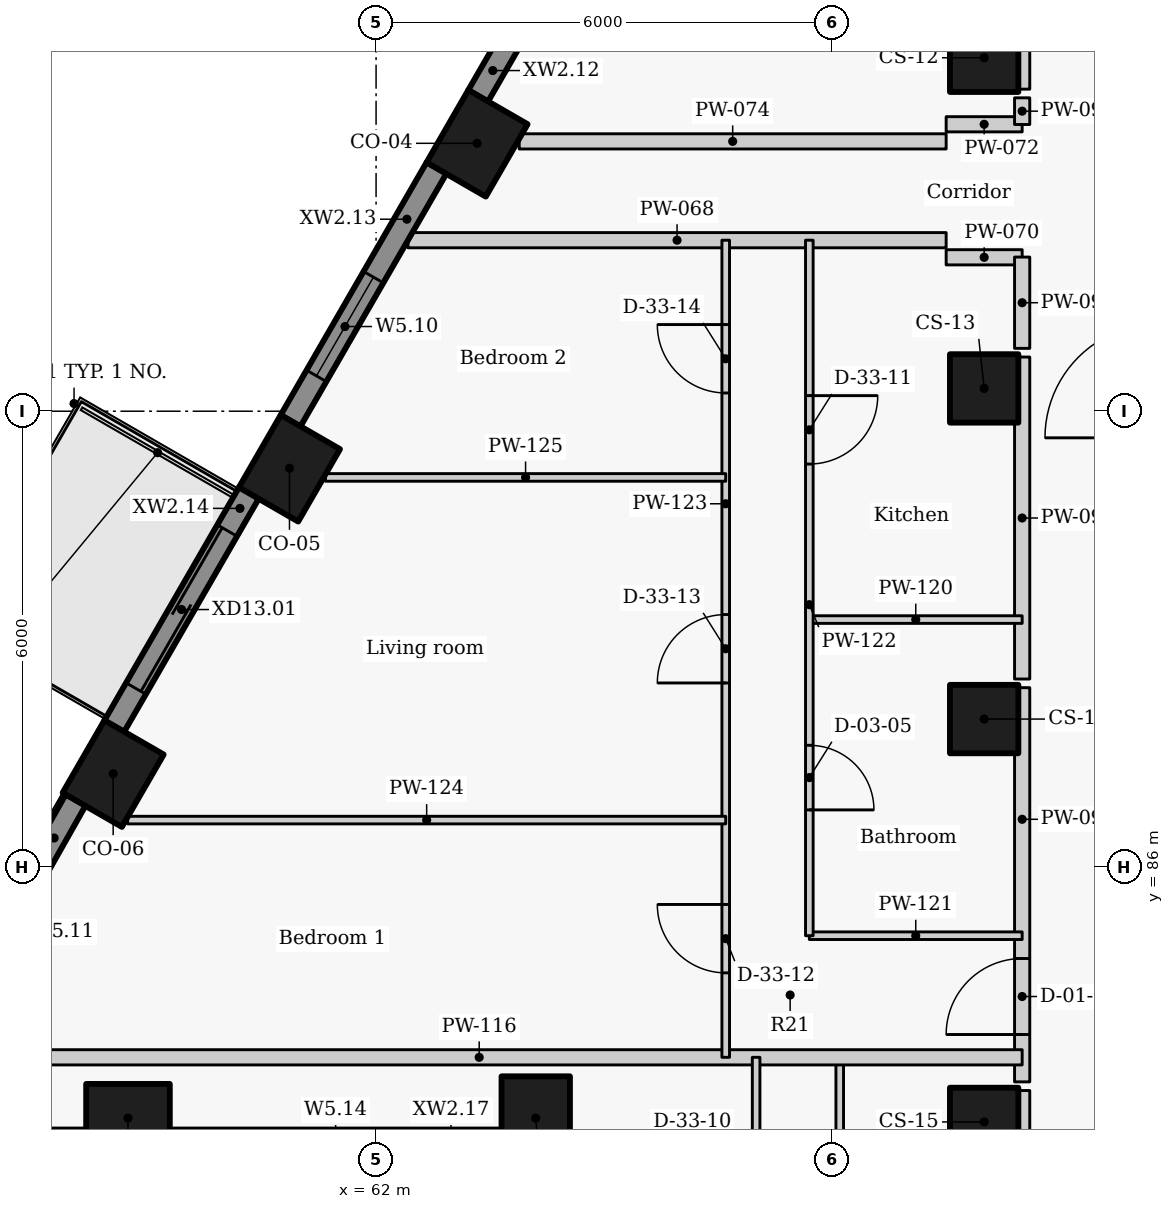
"""IFC4 building model, lengths in metres.
Left out: names, types, materials, properties, quantities, classifications, styles, units other than length and angle.
Written with IfcOpenShell. Run it as: python <this file> out.ifc"""

import sys

from ifc_helpers import new_model, si_unit, direction, frame, frame_2d, origin, origin_2d, place, context, subcontext, project, spatial, rectangle, extrude, element, fill, save


model = new_model("IFC4")
c1 = context("Model", 3, precision=1e-05, world=origin(), true_north=direction((0.0, 1.0)))
c2 = subcontext(c1, "Body", "Model", "MODEL_VIEW")
j1 = project(units=[si_unit("LENGTHUNIT", "METRE"), si_unit("PLANEANGLEUNIT", "RADIAN")], contexts=[c1])
p1 = place(None, origin())
s1 = spatial("IfcSite", under=j1, at=p1, CompositionType="ELEMENT")
p2 = place(p1, origin())
s2 = spatial("IfcBuilding", under=s1, at=p2, CompositionType="ELEMENT")
p3 = place(p2, frame((0.0, 0.0, 259.2)))
s3 = spatial("IfcBuildingStorey", under=s2, at=p3, CompositionType="ELEMENT", Elevation=259.2)
for number, where, z_axis, x_axis in (
    (1, (63.329, 95.525, 0.0), (0.0, 0.0, 1.0), (-0.5, -0.866, 0.0)),
    (2, (60.861, 91.25, 0.0), (0.0, 0.0, 1.0), (-0.5, -0.866, 0.0)),
    (3, (58.541, 87.232, 0.0), (0.0, 0.0, 1.0), (-0.5, -0.866, 0.0)),
    (4, (58.736, 82.7, 0.0), (0.0, 0.0, 1.0), (1.0, 0.0, 0.0)),
    (5, (64.101, 82.7, 0.0), (0.0, 0.0, 1.0), (0.0, -1.0, 0.0)),
):
    element("IfcColumn", number, at=place(p3, frame(where, z_axis=z_axis, x_axis=x_axis)), inside=s3, PredefinedType="COLUMN", context=c2, shape_type="SweptSolid", body=[
        extrude(rectangle(XDim=1.1, YDim=0.9, at=origin_2d()), origin(), (0.0, 0.0, 1.0), 3.3),
    ])
for number, where, z_axis, x_axis in (
    (6, (70.0, 96.65, 0.0), (0.0, 0.0, 1.0), (0.0, -1.0, 0.0)),
    (7, (70.0, 92.3, 0.0), (0.0, 0.0, 1.0), (0.0, -1.0, 0.0)),
    (8, (70.0, 87.95, 0.0), (0.0, 0.0, 1.0), (0.0, -1.0, 0.0)),
    (9, (70.0, 82.65, 0.0), (0.0, 0.0, 1.0), (0.0, -1.0, 0.0)),
):
    element("IfcColumn", number, at=place(p3, frame(where, z_axis=z_axis, x_axis=x_axis)), inside=s3, PredefinedType="COLUMN", context=c2, shape_type="SweptSolid", body=[
        extrude(rectangle(XDim=0.9, YDim=0.9, at=origin_2d()), origin(), (0.0, 0.0, 1.0), 3.3),
    ])
p4 = place(p3, frame((65.264, 99.477, 0.0), z_axis=(0.0, 0.0, 1.0), x_axis=(-0.499984490703, -0.866034357896, 0.0)))
e10 = element("IfcWall", 10, at=p4, inside=s3, PredefinedType="SOLIDWALL", context=c2, shape_type="SweptSolid", body=[
    extrude(rectangle(XDim=3.844, YDim=0.3, at=frame_2d((1.922, 0.0))), origin(), (0.0, 0.0, 1.0), 2.425),
])
p5 = place(p4, frame((0.872, 0.0, 0.9)))
e11 = element("IfcOpeningElement", 11, at=p5, cuts=e10, PredefinedType="OPENING", context=c2, shape_type="SweptSolid", body=[
    extrude(rectangle(XDim=2.1, YDim=1.1, at=frame_2d((1.05, 0.55))), frame((0.0, 0.16, 0.0), z_axis=(0.0, -1.0, 0.0), x_axis=(1.0, 0.0, 0.0)), (0.0, 0.0, 1.0), 0.32),
])
p6 = place(p3, frame((62.796, 95.202, 0.0), z_axis=(0.0, 0.0, 1.0), x_axis=(-0.499984490703, -0.866034357896, 0.0)))
e12 = element("IfcWall", 12, at=p6, inside=s3, PredefinedType="SOLIDWALL", context=c2, shape_type="SweptSolid", body=[
    extrude(rectangle(XDim=3.844, YDim=0.3, at=frame_2d((1.922, 0.0))), origin(), (0.0, 0.0, 1.0), 2.425),
])
p7 = place(p6, frame((1.661, 0.0, 0.9)))
e13 = element("IfcOpeningElement", 13, at=p7, cuts=e12, PredefinedType="OPENING", context=c2, shape_type="SweptSolid", body=[
    extrude(rectangle(XDim=1.5, YDim=1.1, at=frame_2d((0.75, 0.55))), frame((0.0, 0.16, 0.0), z_axis=(0.0, -1.0, 0.0), x_axis=(1.0, 0.0, 0.0)), (0.0, 0.0, 1.0), 0.32),
])
p8 = place(p3, frame((60.328, 90.927, 0.0), z_axis=(0.0, 0.0, 1.0), x_axis=(-0.500010404316, -0.866019396766, 0.0)))
e14 = element("IfcWall", 14, at=p8, inside=s3, PredefinedType="SOLIDWALL", context=c2, shape_type="SweptSolid", body=[
    extrude(rectangle(XDim=3.547, YDim=0.3, at=frame_2d((1.774, 0.0))), origin(), (0.0, 0.0, 1.0), 2.425),
])
p9 = place(p8, frame((0.573, 0.0, 0.0)))
e15 = element("IfcOpeningElement", 15, at=p9, cuts=e14, PredefinedType="OPENING", context=c2, shape_type="SweptSolid", body=[
    extrude(rectangle(XDim=2.4, YDim=2.0, at=frame_2d((1.2, 1.0))), frame((0.0, 0.16, 0.0), z_axis=(0.0, -1.0, 0.0), x_axis=(1.0, 0.0, 0.0)), (0.0, 0.0, 1.0), 0.32),
])
p10 = place(p3, frame((58.048, 86.886, 0.0), z_axis=(0.0, 0.0, 1.0), x_axis=(-0.492080931903, -0.870549456641, 0.0)))
e16 = element("IfcWall", 16, at=p10, inside=s3, PredefinedType="SOLIDWALL", context=c2, shape_type="SweptSolid", body=[
    extrude(rectangle(XDim=5.437, YDim=0.3, at=frame_2d((2.718, 0.0))), origin(), (0.0, 0.0, 1.0), 2.425),
])
p11 = place(p10, frame((1.251, 0.0, 0.9)))
e17 = element("IfcOpeningElement", 17, at=p11, cuts=e16, PredefinedType="OPENING", context=c2, shape_type="SweptSolid", body=[
    extrude(rectangle(XDim=1.5, YDim=1.1, at=frame_2d((0.75, 0.55))), frame((0.0, 0.16, 0.0), z_axis=(0.0, -1.0, 0.0), x_axis=(1.0, 0.0, 0.0)), (0.0, 0.0, 1.0), 0.32),
])
p12 = place(p10, frame((4.04, 0.0, 0.9)))
e18 = element("IfcOpeningElement", 18, at=p12, cuts=e16, PredefinedType="OPENING", context=c2, shape_type="SweptSolid", body=[
    extrude(rectangle(XDim=0.6, YDim=1.1, at=frame_2d((0.3, 0.55))), frame((0.0, 0.16, 0.0), z_axis=(0.0, -1.0, 0.0), x_axis=(1.0, 0.0, 0.0)), (0.0, 0.0, 1.0), 0.32),
])
p13 = place(p3, frame((62.42, 94.25, 0.0), z_axis=(0.0, 0.0, 1.0), x_axis=(1.0, 0.0, 0.0)))
e19 = element("IfcWall", 19, at=p13, inside=s3, PredefinedType="PARTITIONING", context=c2, shape_type="SweptSolid", body=[
    extrude(rectangle(XDim=7.08, YDim=0.2, at=frame_2d((3.54, 0.0))), origin(), (0.0, 0.0, 1.0), 2.405),
])
for number, where, z_axis, x_axis in (
    (20, (69.5, 94.025, 0.0), (0.0, 0.0, 1.0), (1.0, 0.0, 0.0)),
    (21, (69.5, 95.775, 0.0), (0.0, 0.0, 1.0), (1.0, 0.0, 0.0)),
):
    element("IfcWall", number, at=place(p3, frame(where, z_axis=z_axis, x_axis=x_axis)), inside=s3, PredefinedType="PARTITIONING", context=c2, shape_type="SweptSolid", body=[
        extrude(rectangle(XDim=1.0, YDim=0.2, at=frame_2d((0.5, 0.0))), origin(), (0.0, 0.0, 1.0), 2.505),
    ])
p14 = place(p3, frame((63.883, 95.55, 0.0), z_axis=(0.0, 0.0, 1.0), x_axis=(1.0, 0.0, 0.0)))
e22 = element("IfcWall", 22, at=p14, inside=s3, PredefinedType="PARTITIONING", context=c2, shape_type="SweptSolid", body=[
    extrude(rectangle(XDim=5.617, YDim=0.2, at=frame_2d((2.808, 0.0))), origin(), (0.0, 0.0, 1.0), 3.025),
])
p15 = place(p3, frame((70.5, 77.877, 0.0), z_axis=(0.0, 0.0, 1.0), x_axis=(0.0, 1.0, 0.0)))
e23 = element("IfcWall", 23, at=p15, inside=s3, PredefinedType="PARTITIONING", context=c2, shape_type="SweptSolid", body=[
    extrude(rectangle(XDim=5.186, YDim=0.2, at=frame_2d((2.593, 0.0))), origin(), (0.0, 0.0, 1.0), 3.025),
])
p16 = place(p3, frame((70.5, 83.177, 0.0), z_axis=(0.0, 0.0, 1.0), x_axis=(0.0, 1.0, 0.0)))
e24 = element("IfcWall", 24, at=p16, inside=s3, PredefinedType="PARTITIONING", context=c2, shape_type="SweptSolid", body=[
    extrude(rectangle(XDim=5.186, YDim=0.2, at=frame_2d((2.593, 0.0))), origin(), (0.0, 0.0, 1.0), 3.025),
])
p17 = place(p16, frame((0.623, 0.0, 0.0)))
e25 = element("IfcOpeningElement", 25, at=p17, cuts=e24, PredefinedType="OPENING", context=c2, shape_type="SweptSolid", body=[
    extrude(rectangle(XDim=1.0, YDim=2.1, at=frame_2d((0.5, 1.05))), frame((0.0, 0.11, 0.0), z_axis=(0.0, -1.0, 0.0), x_axis=(1.0, 0.0, 0.0)), (0.0, 0.0, 1.0), 0.22),
])
p18 = place(p3, frame((70.5, 88.477, 0.0), z_axis=(0.0, 0.0, 1.0), x_axis=(0.0, 1.0, 0.0)))
e26 = element("IfcWall", 26, at=p18, inside=s3, PredefinedType="PARTITIONING", context=c2, shape_type="SweptSolid", body=[
    extrude(rectangle(XDim=4.236, YDim=0.2, at=frame_2d((2.118, 0.0))), origin(), (0.0, 0.0, 1.0), 3.025),
])
p19 = place(p3, frame((70.5, 92.827, 0.0), z_axis=(0.0, 0.0, 1.0), x_axis=(0.0, 1.0, 0.0)))
e27 = element("IfcWall", 27, at=p19, inside=s3, PredefinedType="PARTITIONING", context=c2, shape_type="SweptSolid", body=[
    extrude(rectangle(XDim=1.201, YDim=0.2, at=frame_2d((0.601, 0.0))), origin(), (0.0, 0.0, 1.0), 3.025),
])
p20 = place(p3, frame((70.5, 95.772, 0.0), z_axis=(0.0, 0.0, 1.0), x_axis=(0.0, 1.0, 0.0)))
e28 = element("IfcWall", 28, at=p20, inside=s3, PredefinedType="PARTITIONING", context=c2, shape_type="SweptSolid", body=[
    extrude(rectangle(XDim=0.351, YDim=0.2, at=frame_2d((0.176, 0.0))), origin(), (0.0, 0.0, 1.0), 3.025),
])
p21 = place(p3, frame((70.5, 96.237, 0.0), z_axis=(0.0, 0.0, 1.0), x_axis=(0.0, 1.0, 0.0)))
e29 = element("IfcWall", 29, at=p21, inside=s3, PredefinedType="PARTITIONING", context=c2, shape_type="SweptSolid", body=[
    extrude(rectangle(XDim=5.176, YDim=0.2, at=frame_2d((2.588, 0.0))), origin(), (0.0, 0.0, 1.0), 3.025),
])
p22 = place(p21, frame((2.088, 0.0, 0.0)))
e30 = element("IfcOpeningElement", 30, at=p22, cuts=e29, PredefinedType="OPENING", context=c2, shape_type="SweptSolid", body=[
    extrude(rectangle(XDim=1.0, YDim=2.1, at=frame_2d((0.5, 1.05))), frame((0.0, 0.11, 0.0), z_axis=(0.0, -1.0, 0.0), x_axis=(1.0, 0.0, 0.0)), (0.0, 0.0, 1.0), 0.22),
])
p23 = place(p3, frame((68.1, 83.5, 0.0), z_axis=(0.0, 0.0, 1.0), x_axis=(0.0, -1.0, 0.0)))
e31 = element("IfcWall", 31, at=p23, inside=s3, PredefinedType="PARTITIONING", context=c2, shape_type="SweptSolid", body=[
    extrude(rectangle(XDim=8.9, YDim=0.1, at=frame_2d((4.45, 0.0))), origin(), (0.0, 0.0, 1.0), 3.025),
])
p24 = place(p23, frame((6.452, 0.0, 0.0)))
e32 = element("IfcOpeningElement", 32, at=p24, cuts=e31, PredefinedType="OPENING", context=c2, shape_type="SweptSolid", body=[
    extrude(rectangle(XDim=0.85, YDim=2.1, at=frame_2d((0.425, 1.05))), frame((0.0, 0.06, 0.0), z_axis=(0.0, -1.0, 0.0), x_axis=(1.0, 0.0, 0.0)), (0.0, 0.0, 1.0), 0.12),
])
p25 = place(p23, frame((1.977, 0.0, 0.0)))
e33 = element("IfcOpeningElement", 33, at=p25, cuts=e31, PredefinedType="OPENING", context=c2, shape_type="SweptSolid", body=[
    extrude(rectangle(XDim=0.9, YDim=2.1, at=frame_2d((0.45, 1.05))), frame((0.0, 0.06, 0.0), z_axis=(0.0, -1.0, 0.0), x_axis=(1.0, 0.0, 0.0)), (0.0, 0.0, 1.0), 0.12),
])
p26 = place(p3, frame((56.213, 83.5, 0.0), z_axis=(0.0, 0.0, 1.0), x_axis=(1.0, 0.0, 0.0)))
e34 = element("IfcWall", 34, at=p26, inside=s3, PredefinedType="PARTITIONING", context=c2, shape_type="SweptSolid", body=[
    extrude(rectangle(XDim=14.287, YDim=0.2, at=frame_2d((7.144, 0.0))), origin(), (0.0, 0.0, 1.0), 2.405),
])
p27 = place(p3, frame((67.0, 73.0, 0.0), z_axis=(0.0, 0.0, 1.0), x_axis=(0.0, 1.0, 0.0)))
e35 = element("IfcWall", 35, at=p27, inside=s3, PredefinedType="PARTITIONING", context=c2, shape_type="SweptSolid", body=[
    extrude(rectangle(XDim=10.5, YDim=0.1, at=frame_2d((5.25, 0.0))), origin(), (0.0, 0.0, 1.0), 3.025),
])
p28 = place(p27, frame((1.074, 0.0, 0.0)))
e36 = element("IfcOpeningElement", 36, at=p28, cuts=e35, PredefinedType="OPENING", context=c2, shape_type="SweptSolid", body=[
    extrude(rectangle(XDim=0.9, YDim=2.1, at=frame_2d((0.45, 1.05))), frame((0.0, 0.06, 0.0), z_axis=(0.0, -1.0, 0.0), x_axis=(1.0, 0.0, 0.0)), (0.0, 0.0, 1.0), 0.12),
])
p29 = place(p27, frame((4.8, 0.0, 0.0)))
e37 = element("IfcOpeningElement", 37, at=p29, cuts=e35, PredefinedType="OPENING", context=c2, shape_type="SweptSolid", body=[
    extrude(rectangle(XDim=0.9, YDim=2.1, at=frame_2d((0.45, 1.05))), frame((0.0, 0.06, 0.0), z_axis=(0.0, -1.0, 0.0), x_axis=(1.0, 0.0, 0.0)), (0.0, 0.0, 1.0), 0.12),
])
p30 = place(p27, frame((8.526, 0.0, 0.0)))
e38 = element("IfcOpeningElement", 38, at=p30, cuts=e35, PredefinedType="OPENING", context=c2, shape_type="SweptSolid", body=[
    extrude(rectangle(XDim=0.9, YDim=2.1, at=frame_2d((0.45, 1.05))), frame((0.0, 0.06, 0.0), z_axis=(0.0, -1.0, 0.0), x_axis=(1.0, 0.0, 0.0)), (0.0, 0.0, 1.0), 0.12),
])
for number, where, z_axis, x_axis in (
    (39, (67.7, 89.259, 0.0), (0.0, 0.0, 1.0), (1.0, 0.0, 0.0)),
    (40, (67.7, 85.1, 0.0), (0.0, 0.0, 1.0), (1.0, 0.0, 0.0)),
):
    element("IfcWall", number, at=place(p3, frame(where, z_axis=z_axis, x_axis=x_axis)), inside=s3, PredefinedType="PARTITIONING", context=c2, shape_type="SweptSolid", body=[
        extrude(rectangle(XDim=2.8, YDim=0.1, at=frame_2d((1.4, 0.0))), origin(), (0.0, 0.0, 1.0), 2.505),
    ])
p31 = place(p3, frame((67.7, 94.25, 0.0), z_axis=(0.0, 0.0, 1.0), x_axis=(0.0, -1.0, 0.0)))
e41 = element("IfcWall", 41, at=p31, inside=s3, PredefinedType="PARTITIONING", context=c2, shape_type="SweptSolid", body=[
    extrude(rectangle(XDim=9.15, YDim=0.1, at=frame_2d((4.575, 0.0))), origin(), (0.0, 0.0, 1.0), 3.025),
])
p32 = place(p31, frame((6.645, 0.0, 0.0)))
e42 = element("IfcOpeningElement", 42, at=p32, cuts=e41, PredefinedType="OPENING", context=c2, shape_type="SweptSolid", body=[
    extrude(rectangle(XDim=0.85, YDim=2.1, at=frame_2d((0.425, 1.05))), frame((0.0, 0.06, 0.0), z_axis=(0.0, -1.0, 0.0), x_axis=(1.0, 0.0, 0.0)), (0.0, 0.0, 1.0), 0.12),
])
p33 = place(p31, frame((2.045, 0.0, 0.0)))
e43 = element("IfcOpeningElement", 43, at=p33, cuts=e41, PredefinedType="OPENING", context=c2, shape_type="SweptSolid", body=[
    extrude(rectangle(XDim=0.9, YDim=2.1, at=frame_2d((0.45, 1.05))), frame((0.0, 0.06, 0.0), z_axis=(0.0, -1.0, 0.0), x_axis=(1.0, 0.0, 0.0)), (0.0, 0.0, 1.0), 0.12),
])
p34 = place(p3, frame((66.6, 83.5, 0.0), z_axis=(0.0, 0.0, 1.0), x_axis=(0.0, 1.0, 0.0)))
e44 = element("IfcWall", 44, at=p34, inside=s3, PredefinedType="PARTITIONING", context=c2, shape_type="SweptSolid", body=[
    extrude(rectangle(XDim=10.75, YDim=0.1, at=frame_2d((5.375, 0.0))), origin(), (0.0, 0.0, 1.0), 3.025),
])
p35 = place(p34, frame((1.111, 0.0, 0.0)))
e45 = element("IfcOpeningElement", 45, at=p35, cuts=e44, PredefinedType="OPENING", context=c2, shape_type="SweptSolid", body=[
    extrude(rectangle(XDim=0.9, YDim=2.1, at=frame_2d((0.45, 1.05))), frame((0.0, 0.06, 0.0), z_axis=(0.0, -1.0, 0.0), x_axis=(1.0, 0.0, 0.0)), (0.0, 0.0, 1.0), 0.12),
])
p36 = place(p34, frame((4.925, 0.0, 0.0)))
e46 = element("IfcOpeningElement", 46, at=p36, cuts=e44, PredefinedType="OPENING", context=c2, shape_type="SweptSolid", body=[
    extrude(rectangle(XDim=0.9, YDim=2.1, at=frame_2d((0.45, 1.05))), frame((0.0, 0.06, 0.0), z_axis=(0.0, -1.0, 0.0), x_axis=(1.0, 0.0, 0.0)), (0.0, 0.0, 1.0), 0.12),
])
p37 = place(p34, frame((8.74, 0.0, 0.0)))
e47 = element("IfcOpeningElement", 47, at=p37, cuts=e44, PredefinedType="OPENING", context=c2, shape_type="SweptSolid", body=[
    extrude(rectangle(XDim=0.9, YDim=2.1, at=frame_2d((0.45, 1.05))), frame((0.0, 0.06, 0.0), z_axis=(0.0, -1.0, 0.0), x_axis=(1.0, 0.0, 0.0)), (0.0, 0.0, 1.0), 0.12),
])
p38 = place(p3, frame((58.731, 86.621, 0.0), z_axis=(0.0, 0.0, 1.0), x_axis=(1.0, 0.0, 0.0)))
e48 = element("IfcWall", 48, at=p38, inside=s3, PredefinedType="PARTITIONING", context=c2, shape_type="SweptSolid", body=[
    extrude(rectangle(XDim=7.869, YDim=0.1, at=frame_2d((3.935, 0.0))), origin(), (0.0, 0.0, 1.0), 3.025),
])
p39 = place(p3, frame((61.334, 91.129, 0.0), z_axis=(0.0, 0.0, 1.0), x_axis=(1.0, 0.0, 0.0)))
e49 = element("IfcWall", 49, at=p39, inside=s3, PredefinedType="PARTITIONING", context=c2, shape_type="SweptSolid", body=[
    extrude(rectangle(XDim=5.266, YDim=0.1, at=frame_2d((2.633, 0.0))), origin(), (0.0, 0.0, 1.0), 3.025),
])
p40 = place(p7, origin())
e50 = element("IfcWindow", 50, at=p40, inside=s3, PartitioningType="SINGLE_PANEL", PredefinedType="WINDOW", context=c2, shape_type="SweptSolid", body=[
    extrude(rectangle(XDim=1.5, YDim=1.1, at=frame_2d((0.75, 0.55))), frame((0.0, 0.03, 0.0), z_axis=(0.0, -1.0, 0.0), x_axis=(1.0, 0.0, 0.0)), (0.0, 0.0, 1.0), 0.06),
])
fill(e13, e50)
p41 = place(p9, origin())
e51 = element("IfcDoor", 51, at=p41, inside=s3, OperationType="DOUBLE_DOOR_SLIDING", PredefinedType="DOOR", context=c2, shape_type="SweptSolid", body=[
    extrude(rectangle(XDim=2.4, YDim=2.0, at=frame_2d((1.2, 1.0))), frame((0.0, 0.025, 0.0), z_axis=(0.0, -1.0, 0.0), x_axis=(1.0, 0.0, 0.0)), (0.0, 0.0, 1.0), 0.05),
])
fill(e15, e51)
p42 = place(p17, origin())
e52 = element("IfcDoor", 52, at=p42, inside=s3, OperationType="SINGLE_SWING_LEFT", PredefinedType="DOOR", context=c2, shape_type="SweptSolid", body=[
    extrude(rectangle(XDim=1.0, YDim=2.1, at=frame_2d((0.5, 1.05))), frame((0.0, 0.025, 0.0), z_axis=(0.0, -1.0, 0.0), x_axis=(1.0, 0.0, 0.0)), (0.0, 0.0, 1.0), 0.05),
])
fill(e25, e52)
p43 = place(p32, origin())
e53 = element("IfcDoor", 53, at=p43, inside=s3, OperationType="SINGLE_SWING_RIGHT", PredefinedType="DOOR", context=c2, shape_type="SweptSolid", body=[
    extrude(rectangle(XDim=0.85, YDim=2.1, at=frame_2d((0.425, 1.05))), frame((0.0, 0.025, 0.0), z_axis=(0.0, -1.0, 0.0), x_axis=(1.0, 0.0, 0.0)), (0.0, 0.0, 1.0), 0.05),
])
fill(e42, e53)
p44 = place(p33, origin())
e54 = element("IfcDoor", 54, at=p44, inside=s3, OperationType="SINGLE_SWING_LEFT", PredefinedType="DOOR", context=c2, shape_type="SweptSolid", body=[
    extrude(rectangle(XDim=0.9, YDim=2.1, at=frame_2d((0.45, 1.05))), frame((0.0, 0.025, 0.0), z_axis=(0.0, -1.0, 0.0), x_axis=(1.0, 0.0, 0.0)), (0.0, 0.0, 1.0), 0.05),
])
fill(e43, e54)
p45 = place(p35, origin())
e55 = element("IfcDoor", 55, at=p45, inside=s3, OperationType="SINGLE_SWING_RIGHT", PredefinedType="DOOR", context=c2, shape_type="SweptSolid", body=[
    extrude(rectangle(XDim=0.9, YDim=2.1, at=frame_2d((0.45, 1.05))), frame((0.0, 0.025, 0.0), z_axis=(0.0, -1.0, 0.0), x_axis=(1.0, 0.0, 0.0)), (0.0, 0.0, 1.0), 0.05),
])
fill(e45, e55)
p46 = place(p36, origin())
e56 = element("IfcDoor", 56, at=p46, inside=s3, OperationType="SINGLE_SWING_LEFT", PredefinedType="DOOR", context=c2, shape_type="SweptSolid", body=[
    extrude(rectangle(XDim=0.9, YDim=2.1, at=frame_2d((0.45, 1.05))), frame((0.0, 0.025, 0.0), z_axis=(0.0, -1.0, 0.0), x_axis=(1.0, 0.0, 0.0)), (0.0, 0.0, 1.0), 0.05),
])
fill(e46, e56)
p47 = place(p37, origin())
e57 = element("IfcDoor", 57, at=p47, inside=s3, OperationType="SINGLE_SWING_RIGHT", PredefinedType="DOOR", context=c2, shape_type="SweptSolid", body=[
    extrude(rectangle(XDim=0.9, YDim=2.1, at=frame_2d((0.45, 1.05))), frame((0.0, 0.025, 0.0), z_axis=(0.0, -1.0, 0.0), x_axis=(1.0, 0.0, 0.0)), (0.0, 0.0, 1.0), 0.05),
])
fill(e47, e57)
save(model, sys.argv[1])
